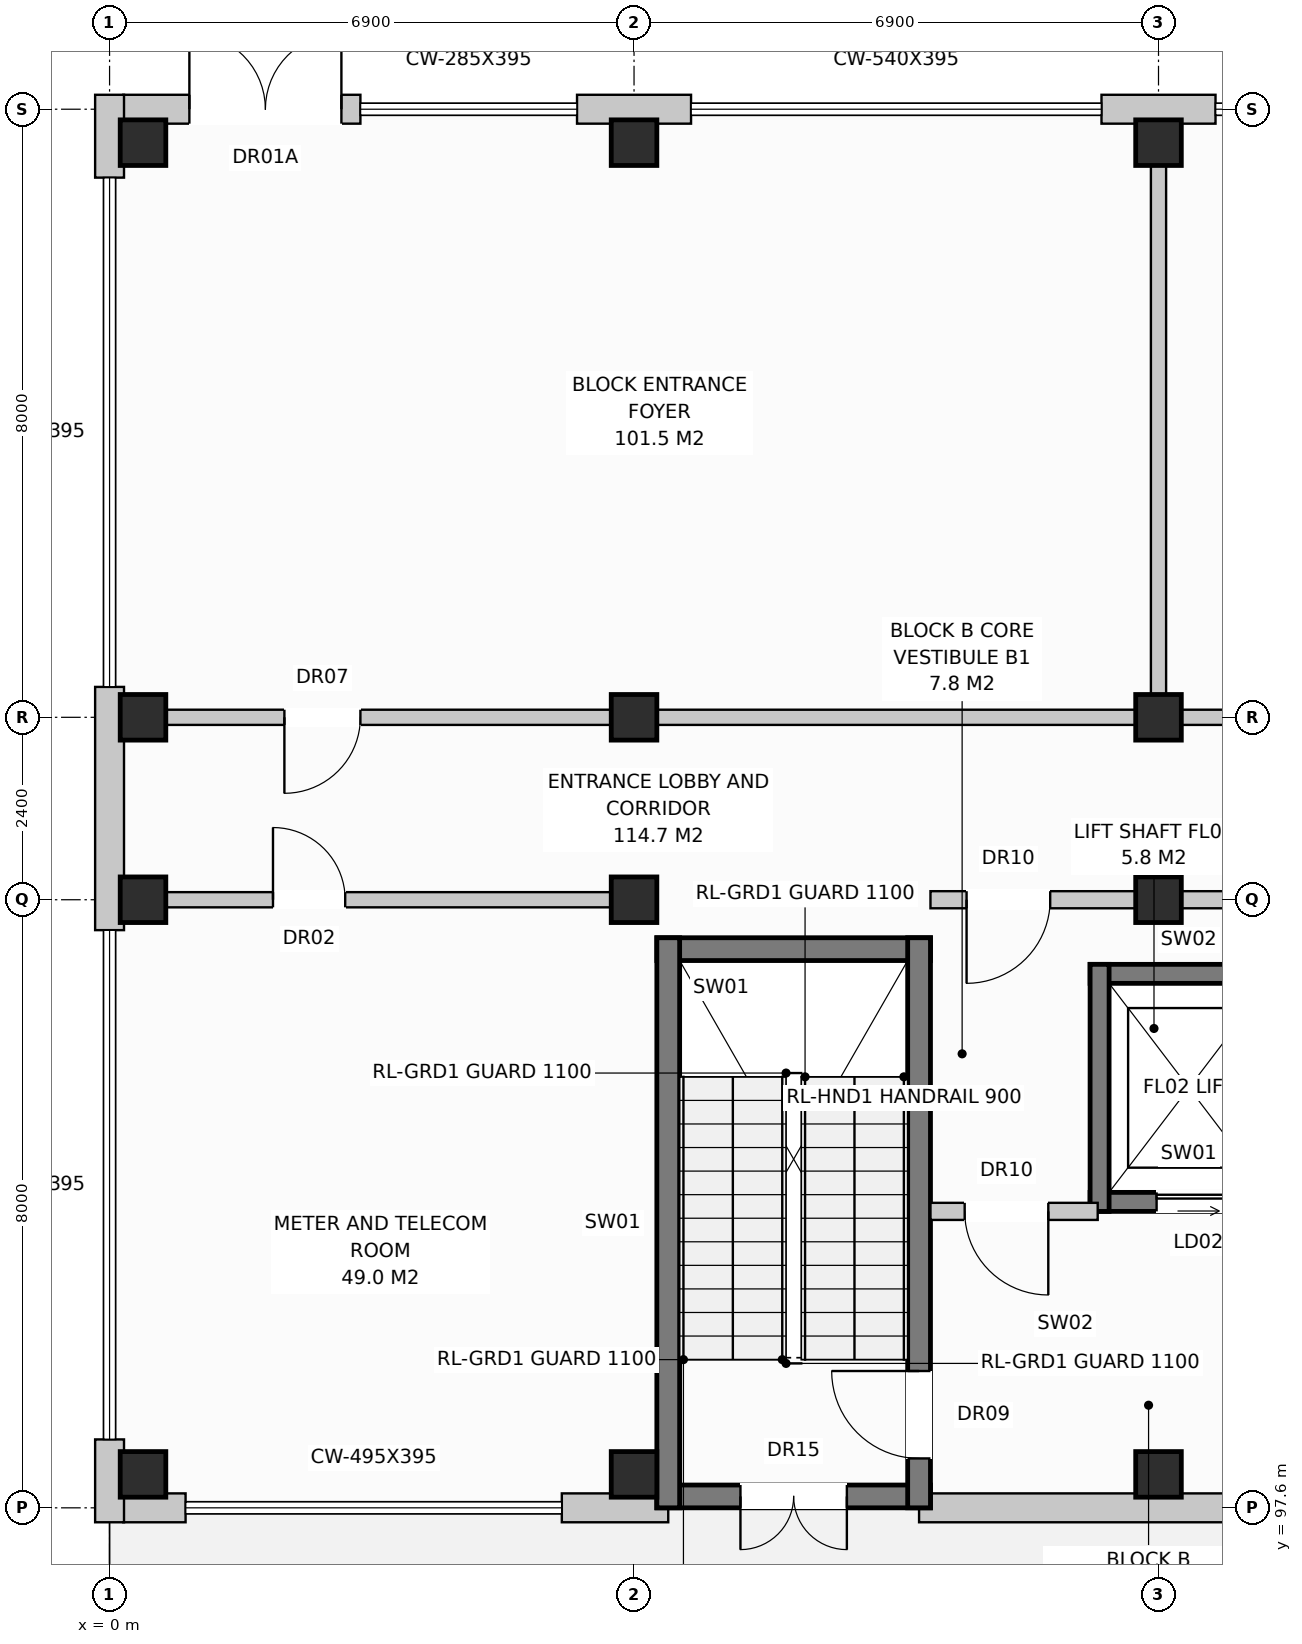
"""IFC4 building model, lengths in metres.
Left out: names, types, materials, properties, quantities, classifications, styles, units other than length and angle.
Written with IfcOpenShell. Run it as: python <this file> out.ifc"""

import sys

from ifc_helpers import new_model, si_unit, direction, frame, frame_2d, origin, origin_with_axes, origin_2d, place, context, subcontext, project, spatial, rectangle, extrude, element, fill, save


model = new_model("IFC4")
c1 = context("Model", 3, precision=1e-05, world=origin(), true_north=direction((0.0, 1.0)))
c2 = subcontext(c1, "Body", "Model", "MODEL_VIEW")
j1 = project(units=[si_unit("LENGTHUNIT", "METRE"), si_unit("PLANEANGLEUNIT", "RADIAN")], contexts=[c1])
p1 = place(None, origin())
s1 = spatial("IfcSite", under=j1, at=p1, CompositionType="ELEMENT")
p2 = place(p1, origin())
s2 = spatial("IfcBuilding", under=s1, at=p2, CompositionType="ELEMENT")
p3 = place(p2, origin())
s3 = spatial("IfcBuildingStorey", under=s2, at=p3, CompositionType="ELEMENT", Elevation=0.0)
for number, where, z_axis, x_axis in (
    (1, (0.44, 98.04, 0.0), (0.0, 0.0, 1.0), (1.0, 0.0, 0.0)),
    (2, (0.44, 105.6, 0.0), (0.0, 0.0, 1.0), (1.0, 0.0, 0.0)),
    (3, (0.44, 108.0, 0.0), (0.0, 0.0, 1.0), (1.0, 0.0, 0.0)),
    (4, (0.44, 115.56, 0.0), (0.0, 0.0, 1.0), (1.0, 0.0, 0.0)),
    (5, (6.9, 98.04, 0.0), (0.0, 0.0, 1.0), (1.0, 0.0, 0.0)),
    (6, (6.9, 105.6, 0.0), (0.0, 0.0, 1.0), (1.0, 0.0, 0.0)),
    (7, (6.9, 108.0, 0.0), (0.0, 0.0, 1.0), (1.0, 0.0, 0.0)),
    (8, (6.9, 115.56, 0.0), (0.0, 0.0, 1.0), (1.0, 0.0, 0.0)),
    (9, (13.8, 98.04, 0.0), (0.0, 0.0, 1.0), (1.0, 0.0, 0.0)),
    (10, (13.8, 105.6, 0.0), (0.0, 0.0, 1.0), (1.0, 0.0, 0.0)),
    (11, (13.8, 108.0, 0.0), (0.0, 0.0, 1.0), (1.0, 0.0, 0.0)),
    (12, (13.8, 115.56, 0.0), (0.0, 0.0, 1.0), (1.0, 0.0, 0.0)),
):
    element("IfcColumn", number, at=place(p3, frame(where, z_axis=z_axis, x_axis=x_axis)), inside=s3, PredefinedType="COLUMN", context=c2, shape_type="SweptSolid", body=[
        extrude(rectangle(XDim=0.6, YDim=0.6, at=origin_2d()), origin(), (0.0, 0.0, 1.0), 4.4),
    ])
p4 = place(p3, frame((0.18, 97.6, 0.0), z_axis=(0.0, 0.0, 1.0), x_axis=(1.0, 0.0, 0.0)))
e13 = element("IfcWall", 13, at=p4, inside=s3, PredefinedType="STANDARD", context=c2, shape_type="SweptSolid", body=[
    extrude(rectangle(XDim=0.82, YDim=0.38, at=frame_2d((0.41, 0.0))), origin(), (0.0, 0.0, 1.0), 4.12),
])
p5 = place(p3, frame((5.95, 97.6, 0.0), z_axis=(0.0, 0.0, 1.0), x_axis=(1.0, 0.0, 0.0)))
e14 = element("IfcWall", 14, at=p5, inside=s3, PredefinedType="STANDARD", context=c2, shape_type="SweptSolid", body=[
    extrude(rectangle(XDim=1.4, YDim=0.38, at=frame_2d((0.7, 0.0))), origin(), (0.0, 0.0, 1.0), 4.12),
])
p6 = place(p3, frame((10.65, 97.6, 0.0), z_axis=(0.0, 0.0, 1.0), x_axis=(1.0, 0.0, 0.0)))
e15 = element("IfcWall", 15, at=p6, inside=s3, PredefinedType="STANDARD", context=c2, shape_type="SweptSolid", body=[
    extrude(rectangle(XDim=11.0, YDim=0.38, at=frame_2d((5.5, 0.0))), origin(), (0.0, 0.0, 1.0), 4.12),
])
p7 = place(p3, frame((0.18, 116.0, 0.0), z_axis=(0.0, 0.0, 1.0), x_axis=(1.0, 0.0, 0.0)))
e16 = element("IfcWall", 16, at=p7, inside=s3, PredefinedType="STANDARD", context=c2, shape_type="SweptSolid", body=[
    extrude(rectangle(XDim=3.12, YDim=0.38, at=frame_2d((1.56, 0.0))), origin(), (0.0, 0.0, 1.0), 4.12),
])
p8 = place(p7, frame((0.87, 0.0, 0.0)))
e17 = element("IfcOpeningElement", 17, at=p8, cuts=e16, PredefinedType="OPENING", context=c2, shape_type="SweptSolid", body=[
    extrude(rectangle(XDim=2.0, YDim=2.45, at=frame_2d((1.0, 1.225))), frame((0.0, 0.202, 0.0), z_axis=(0.0, -1.0, 0.0), x_axis=(1.0, 0.0, 0.0)), (0.0, 0.0, 1.0), 0.404),
])
for number, where, z_axis, x_axis in (
    (18, (6.15, 116.0, 0.0), (0.0, 0.0, 1.0), (1.0, 0.0, 0.0)),
    (19, (13.05, 116.0, 0.0), (0.0, 0.0, 1.0), (1.0, 0.0, 0.0)),
):
    element("IfcWall", number, at=place(p3, frame(where, z_axis=z_axis, x_axis=x_axis)), inside=s3, PredefinedType="STANDARD", context=c2, shape_type="SweptSolid", body=[
        extrude(rectangle(XDim=1.5, YDim=0.38, at=frame_2d((0.75, 0.0))), origin(), (0.0, 0.0, 1.0), 4.12),
    ])
p9 = place(p3, frame((0.0, 97.41, 0.0), z_axis=(0.0, 0.0, 1.0), x_axis=(0.0, 1.0, 0.0)))
e20 = element("IfcWall", 20, at=p9, inside=s3, PredefinedType="STANDARD", context=c2, shape_type="SweptSolid", body=[
    extrude(rectangle(XDim=1.09, YDim=0.38, at=frame_2d((0.545, 0.0))), origin(), (0.0, 0.0, 1.0), 4.12),
])
p10 = place(p3, frame((0.0, 105.2, 0.0), z_axis=(0.0, 0.0, 1.0), x_axis=(0.0, 1.0, 0.0)))
e21 = element("IfcWall", 21, at=p10, inside=s3, PredefinedType="STANDARD", context=c2, shape_type="SweptSolid", body=[
    extrude(rectangle(XDim=3.2, YDim=0.38, at=frame_2d((1.6, 0.0))), origin(), (0.0, 0.0, 1.0), 4.12),
])
p11 = place(p3, frame((0.0, 115.1, 0.0), z_axis=(0.0, 0.0, 1.0), x_axis=(0.0, 1.0, 0.0)))
e22 = element("IfcWall", 22, at=p11, inside=s3, PredefinedType="STANDARD", context=c2, shape_type="SweptSolid", body=[
    extrude(rectangle(XDim=1.09, YDim=0.38, at=frame_2d((0.545, 0.0))), origin(), (0.0, 0.0, 1.0), 4.12),
])
p12 = place(p3, frame((7.2, 97.75, 0.0), z_axis=(0.0, 0.0, 1.0), x_axis=(1.0, 0.0, 0.0)))
e23 = element("IfcWall", 23, at=p12, inside=s3, PredefinedType="SHEAR", context=c2, shape_type="SweptSolid", body=[
    extrude(rectangle(XDim=3.6, YDim=0.3, at=frame_2d((1.8, 0.0))), origin(), (0.0, 0.0, 1.0), 4.12),
])
p13 = place(p12, frame((1.1, 0.0, 0.0)))
e24 = element("IfcOpeningElement", 24, at=p13, cuts=e23, PredefinedType="OPENING", context=c2, shape_type="SweptSolid", body=[
    extrude(rectangle(XDim=1.4, YDim=2.25, at=frame_2d((0.7, 1.125))), frame((0.0, 0.162, 0.0), z_axis=(0.0, -1.0, 0.0), x_axis=(1.0, 0.0, 0.0)), (0.0, 0.0, 1.0), 0.324),
])
p14 = place(p3, frame((7.2, 104.95, 0.0), z_axis=(0.0, 0.0, 1.0), x_axis=(1.0, 0.0, 0.0)))
e25 = element("IfcWall", 25, at=p14, inside=s3, PredefinedType="SHEAR", context=c2, shape_type="SweptSolid", body=[
    extrude(rectangle(XDim=3.6, YDim=0.3, at=frame_2d((1.8, 0.0))), origin(), (0.0, 0.0, 1.0), 4.12),
])
p15 = place(p3, frame((7.35, 97.6, 0.0), z_axis=(0.0, 0.0, 1.0), x_axis=(0.0, 1.0, 0.0)))
e26 = element("IfcWall", 26, at=p15, inside=s3, PredefinedType="SHEAR", context=c2, shape_type="SweptSolid", body=[
    extrude(rectangle(XDim=7.5, YDim=0.3, at=frame_2d((3.75, 0.0))), origin(), (0.0, 0.0, 1.0), 4.12),
])
p16 = place(p3, frame((10.65, 97.6, 0.0), z_axis=(0.0, 0.0, 1.0), x_axis=(0.0, 1.0, 0.0)))
e27 = element("IfcWall", 27, at=p16, inside=s3, PredefinedType="SHEAR", context=c2, shape_type="SweptSolid", body=[
    extrude(rectangle(XDim=7.5, YDim=0.3, at=frame_2d((3.75, 0.0))), origin(), (0.0, 0.0, 1.0), 4.12),
])
p17 = place(p16, frame((0.65, 0.0, 0.0)))
e28 = element("IfcOpeningElement", 28, at=p17, cuts=e27, PredefinedType="OPENING", context=c2, shape_type="SweptSolid", body=[
    extrude(rectangle(XDim=1.15, YDim=2.15, at=frame_2d((0.575, 1.075))), frame((0.0, 0.162, 0.0), z_axis=(0.0, -1.0, 0.0), x_axis=(1.0, 0.0, 0.0)), (0.0, 0.0, 1.0), 0.324),
])
p18 = place(p3, frame((12.9, 101.625, 0.0), z_axis=(0.0, 0.0, 1.0), x_axis=(1.0, 0.0, 0.0)))
e29 = element("IfcWall", 29, at=p18, inside=s3, PredefinedType="SHEAR", context=c2, shape_type="SweptSolid", body=[
    extrude(rectangle(XDim=2.6, YDim=0.25, at=frame_2d((1.3, 0.0))), origin(), (0.0, 0.0, 1.0), 4.12),
])
p19 = place(p18, frame((0.875, 0.0, 0.0)))
e30 = element("IfcOpeningElement", 30, at=p19, cuts=e29, PredefinedType="OPENING", context=c2, shape_type="SweptSolid", body=[
    extrude(rectangle(XDim=1.1, YDim=2.1, at=frame_2d((0.55, 1.05))), frame((0.0, 0.137, 0.0), z_axis=(0.0, -1.0, 0.0), x_axis=(1.0, 0.0, 0.0)), (0.0, 0.0, 1.0), 0.274),
])
p20 = place(p3, frame((12.9, 104.625, 0.0), z_axis=(0.0, 0.0, 1.0), x_axis=(1.0, 0.0, 0.0)))
e31 = element("IfcWall", 31, at=p20, inside=s3, PredefinedType="SHEAR", context=c2, shape_type="SweptSolid", body=[
    extrude(rectangle(XDim=2.6, YDim=0.25, at=frame_2d((1.3, 0.0))), origin(), (0.0, 0.0, 1.0), 4.12),
])
p21 = place(p3, frame((13.025, 101.5, 0.0), z_axis=(0.0, 0.0, 1.0), x_axis=(0.0, 1.0, 0.0)))
e32 = element("IfcWall", 32, at=p21, inside=s3, PredefinedType="SHEAR", context=c2, shape_type="SweptSolid", body=[
    extrude(rectangle(XDim=3.25, YDim=0.25, at=frame_2d((1.625, 0.0))), origin(), (0.0, 0.0, 1.0), 4.12),
])
p22 = place(p3, frame((10.8, 101.5, 0.0), z_axis=(0.0, 0.0, 1.0), x_axis=(1.0, 0.0, 0.0)))
e33 = element("IfcWall", 33, at=p22, inside=s3, PredefinedType="PARTITIONING", context=c2, shape_type="SweptSolid", body=[
    extrude(rectangle(XDim=2.2, YDim=0.225, at=frame_2d((1.1, 0.0))), origin(), (0.0, 0.0, 1.0), 4.12),
])
p23 = place(p22, frame((0.45, 0.0, 0.0)))
e34 = element("IfcOpeningElement", 34, at=p23, cuts=e33, PredefinedType="OPENING", context=c2, shape_type="SweptSolid", body=[
    extrude(rectangle(XDim=1.1, YDim=2.15, at=frame_2d((0.55, 1.075))), frame((0.0, 0.125, 0.0), z_axis=(0.0, -1.0, 0.0), x_axis=(1.0, 0.0, 0.0)), (0.0, 0.0, 1.0), 0.249),
])
p24 = place(p3, frame((6.9, 105.6, 0.0), z_axis=(0.0, 0.0, 1.0), x_axis=(1.0, 0.0, 0.0)))
e35 = element("IfcWall", 35, at=p24, inside=s3, PredefinedType="PARTITIONING", context=c2, shape_type="SweptSolid", body=[
    extrude(rectangle(XDim=0.3, YDim=0.225, at=frame_2d((0.15, 0.0))), origin(), (0.0, 0.0, 1.0), 4.12),
])
p25 = place(p3, frame((10.8, 105.6, 0.0), z_axis=(0.0, 0.0, 1.0), x_axis=(1.0, 0.0, 0.0)))
e36 = element("IfcWall", 36, at=p25, inside=s3, PredefinedType="PARTITIONING", context=c2, shape_type="SweptSolid", body=[
    extrude(rectangle(XDim=9.9, YDim=0.225, at=frame_2d((4.95, 0.0))), origin(), (0.0, 0.0, 1.0), 3.56),
])
p26 = place(p25, frame((0.475, 0.0, 0.0)))
e37 = element("IfcOpeningElement", 37, at=p26, cuts=e36, PredefinedType="OPENING", context=c2, shape_type="SweptSolid", body=[
    extrude(rectangle(XDim=1.1, YDim=2.15, at=frame_2d((0.55, 1.075))), frame((0.0, 0.125, 0.0), z_axis=(0.0, -1.0, 0.0), x_axis=(1.0, 0.0, 0.0)), (0.0, 0.0, 1.0), 0.249),
])
p27 = place(p25, frame((5.75, 0.0, 0.0)))
e38 = element("IfcOpeningElement", 38, at=p27, cuts=e36, PredefinedType="OPENING", context=c2, shape_type="SweptSolid", body=[
    extrude(rectangle(XDim=0.9, YDim=2.1, at=frame_2d((0.45, 1.05))), frame((0.0, 0.125, 0.0), z_axis=(0.0, -1.0, 0.0), x_axis=(1.0, 0.0, 0.0)), (0.0, 0.0, 1.0), 0.249),
])
p28 = place(p25, frame((7.8, 0.0, 0.0)))
e39 = element("IfcOpeningElement", 39, at=p28, cuts=e36, PredefinedType="OPENING", context=c2, shape_type="SweptSolid", body=[
    extrude(rectangle(XDim=0.95, YDim=2.15, at=frame_2d((0.475, 1.075))), frame((0.0, 0.125, 0.0), z_axis=(0.0, -1.0, 0.0), x_axis=(1.0, 0.0, 0.0)), (0.0, 0.0, 1.0), 0.249),
])
p29 = place(p3, frame((0.3, 108.0, 0.0), z_axis=(0.0, 0.0, 1.0), x_axis=(1.0, 0.0, 0.0)))
e40 = element("IfcWall", 40, at=p29, inside=s3, PredefinedType="PARTITIONING", context=c2, shape_type="SweptSolid", body=[
    extrude(rectangle(XDim=13.35, YDim=0.2, at=frame_2d((6.675, 0.0))), origin(), (0.0, 0.0, 1.0), 3.56),
])
p30 = place(p29, frame((2.0, 0.0, 0.0)))
e41 = element("IfcOpeningElement", 41, at=p30, cuts=e40, PredefinedType="OPENING", context=c2, shape_type="SweptSolid", body=[
    extrude(rectangle(XDim=1.0, YDim=2.15, at=frame_2d((0.5, 1.075))), frame((0.0, 0.112, 0.0), z_axis=(0.0, -1.0, 0.0), x_axis=(1.0, 0.0, 0.0)), (0.0, 0.0, 1.0), 0.224),
])
p31 = place(p3, frame((13.8, 108.15, 0.0), z_axis=(0.0, 0.0, 1.0), x_axis=(0.0, 1.0, 0.0)))
e42 = element("IfcWall", 42, at=p31, inside=s3, PredefinedType="PARTITIONING", context=c2, shape_type="SweptSolid", body=[
    extrude(rectangle(XDim=7.6, YDim=0.2, at=frame_2d((3.8, 0.0))), origin(), (0.0, 0.0, 1.0), 4.12),
])
p32 = place(p3, frame((13.95, 108.0, 0.0), z_axis=(0.0, 0.0, 1.0), x_axis=(1.0, 0.0, 0.0)))
e43 = element("IfcWall", 43, at=p32, inside=s3, PredefinedType="PARTITIONING", context=c2, shape_type="SweptSolid", body=[
    extrude(rectangle(XDim=13.5, YDim=0.2, at=frame_2d((6.75, 0.0))), origin(), (0.0, 0.0, 1.0), 3.56),
])
p33 = place(p32, frame((2.0, 0.0, 0.0)))
e44 = element("IfcOpeningElement", 44, at=p33, cuts=e43, PredefinedType="OPENING", context=c2, shape_type="SweptSolid", body=[
    extrude(rectangle(XDim=1.0, YDim=2.15, at=frame_2d((0.5, 1.075))), frame((0.0, 0.112, 0.0), z_axis=(0.0, -1.0, 0.0), x_axis=(1.0, 0.0, 0.0)), (0.0, 0.0, 1.0), 0.224),
])
p34 = place(p3, frame((0.25, 105.6, 0.0), z_axis=(0.0, 0.0, 1.0), x_axis=(1.0, 0.0, 0.0)))
e45 = element("IfcWall", 45, at=p34, inside=s3, PredefinedType="PARTITIONING", context=c2, shape_type="SweptSolid", body=[
    extrude(rectangle(XDim=6.45, YDim=0.2, at=frame_2d((3.225, 0.0))), origin(), (0.0, 0.0, 1.0), 3.56),
])
p35 = place(p34, frame((1.9, 0.0, 0.0)))
e46 = element("IfcOpeningElement", 46, at=p35, cuts=e45, PredefinedType="OPENING", context=c2, shape_type="SweptSolid", body=[
    extrude(rectangle(XDim=0.95, YDim=2.15, at=frame_2d((0.475, 1.075))), frame((0.0, 0.112, 0.0), z_axis=(0.0, -1.0, 0.0), x_axis=(1.0, 0.0, 0.0)), (0.0, 0.0, 1.0), 0.224),
])
p36 = place(p8, origin_with_axes())
e47 = element("IfcDoor", 47, at=p36, inside=s3, OperationType="DOUBLE_DOOR_SINGLE_SWING", PredefinedType="DOOR", context=c2, shape_type="SweptSolid", body=[
    extrude(rectangle(XDim=2.0, YDim=2.45, at=frame_2d((1.0, 1.225))), frame((0.0, 0.025, 0.0), z_axis=(0.0, -1.0, 0.0), x_axis=(1.0, 0.0, 0.0)), (0.0, 0.0, 1.0), 0.05),
])
fill(e17, e47)
p37 = place(p13, frame((1.4, 0.0, 0.0), z_axis=(0.0, 0.0, 1.0), x_axis=(-1.0, 0.0, 0.0)))
e48 = element("IfcDoor", 48, at=p37, inside=s3, OperationType="DOUBLE_DOOR_SINGLE_SWING", PredefinedType="DOOR", context=c2, shape_type="SweptSolid", body=[
    extrude(rectangle(XDim=1.4, YDim=2.25, at=frame_2d((0.7, 1.125))), frame((0.0, 0.025, 0.0), z_axis=(0.0, -1.0, 0.0), x_axis=(1.0, 0.0, 0.0)), (0.0, 0.0, 1.0), 0.05),
])
fill(e24, e48)
p38 = place(p17, origin_with_axes())
e49 = element("IfcDoor", 49, at=p38, inside=s3, OperationType="SINGLE_SWING_RIGHT", PredefinedType="DOOR", context=c2, shape_type="SweptSolid", body=[
    extrude(rectangle(XDim=1.15, YDim=2.15, at=frame_2d((0.575, 1.075))), frame((0.0, 0.025, 0.0), z_axis=(0.0, -1.0, 0.0), x_axis=(1.0, 0.0, 0.0)), (0.0, 0.0, 1.0), 0.05),
])
fill(e28, e49)
p39 = place(p19, origin_with_axes())
e50 = element("IfcDoor", 50, at=p39, inside=s3, OperationType="SLIDING_TO_LEFT", PredefinedType="DOOR", context=c2, shape_type="SweptSolid", body=[
    extrude(rectangle(XDim=1.1, YDim=2.1, at=frame_2d((0.55, 1.05))), frame((0.0, 0.025, 0.0), z_axis=(0.0, -1.0, 0.0), x_axis=(1.0, 0.0, 0.0)), (0.0, 0.0, 1.0), 0.05),
])
fill(e30, e50)
p40 = place(p23, frame((1.1, 0.0, 0.0), z_axis=(0.0, 0.0, 1.0), x_axis=(-1.0, 0.0, 0.0)))
e51 = element("IfcDoor", 51, at=p40, inside=s3, OperationType="SINGLE_SWING_RIGHT", PredefinedType="DOOR", context=c2, shape_type="SweptSolid", body=[
    extrude(rectangle(XDim=1.1, YDim=2.15, at=frame_2d((0.55, 1.075))), frame((0.0, 0.025, 0.0), z_axis=(0.0, -1.0, 0.0), x_axis=(1.0, 0.0, 0.0)), (0.0, 0.0, 1.0), 0.05),
])
fill(e34, e51)
p41 = place(p26, frame((1.1, 0.0, 0.0), z_axis=(0.0, 0.0, 1.0), x_axis=(-1.0, 0.0, 0.0)))
e52 = element("IfcDoor", 52, at=p41, inside=s3, OperationType="SINGLE_SWING_LEFT", PredefinedType="DOOR", context=c2, shape_type="SweptSolid", body=[
    extrude(rectangle(XDim=1.1, YDim=2.15, at=frame_2d((0.55, 1.075))), frame((0.0, 0.025, 0.0), z_axis=(0.0, -1.0, 0.0), x_axis=(1.0, 0.0, 0.0)), (0.0, 0.0, 1.0), 0.05),
])
fill(e37, e52)
p42 = place(p30, frame((1.0, 0.0, 0.0), z_axis=(0.0, 0.0, 1.0), x_axis=(-1.0, 0.0, 0.0)))
e53 = element("IfcDoor", 53, at=p42, inside=s3, OperationType="SINGLE_SWING_LEFT", PredefinedType="DOOR", context=c2, shape_type="SweptSolid", body=[
    extrude(rectangle(XDim=1.0, YDim=2.15, at=frame_2d((0.5, 1.075))), frame((0.0, 0.025, 0.0), z_axis=(0.0, -1.0, 0.0), x_axis=(1.0, 0.0, 0.0)), (0.0, 0.0, 1.0), 0.05),
])
fill(e41, e53)
p43 = place(p35, origin_with_axes())
e54 = element("IfcDoor", 54, at=p43, inside=s3, OperationType="SINGLE_SWING_LEFT", PredefinedType="DOOR", context=c2, shape_type="SweptSolid", body=[
    extrude(rectangle(XDim=0.95, YDim=2.15, at=frame_2d((0.475, 1.075))), frame((0.0, 0.025, 0.0), z_axis=(0.0, -1.0, 0.0), x_axis=(1.0, 0.0, 0.0)), (0.0, 0.0, 1.0), 0.05),
])
fill(e46, e54)
save(model, sys.argv[1])
